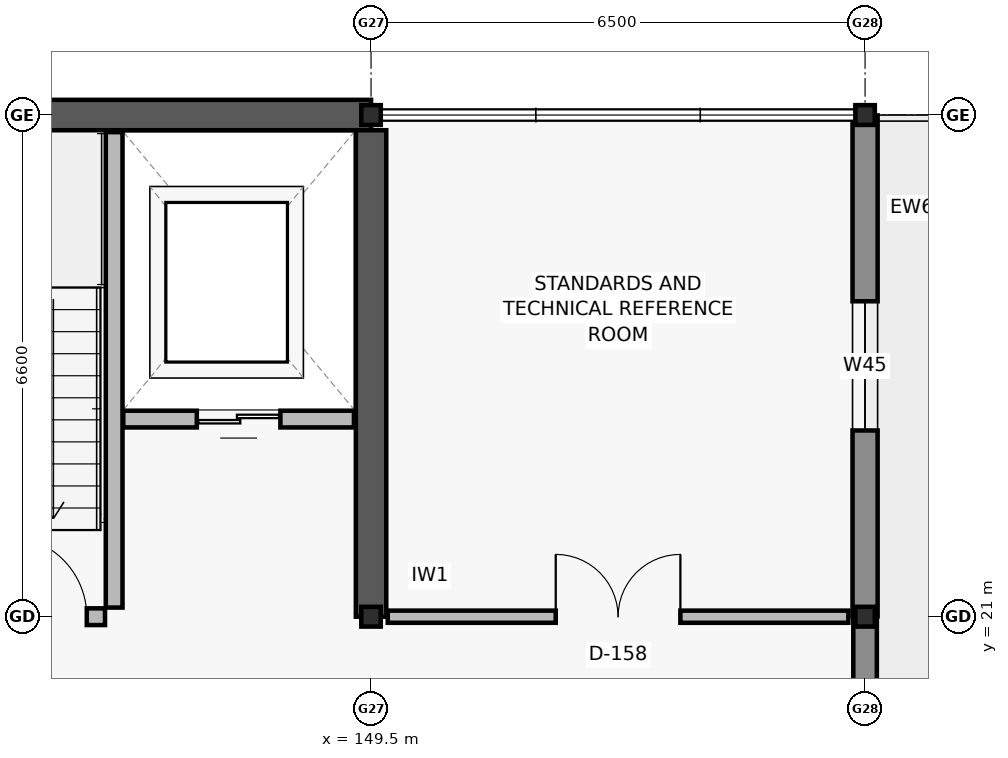
"""IFC4 building model, lengths in metres.
Left out: names, types, materials, properties, quantities, classifications, styles, units other than length and angle.
Written with IfcOpenShell. Run it as: python <this file> out.ifc"""

import sys

from ifc_helpers import new_model, si_unit, direction, frame, frame_2d, origin, origin_2d, place, context, subcontext, project, spatial, rectangle, i_section, extrude, element, fill, save


model = new_model("IFC4")
c1 = context("Model", 3, precision=1e-05, world=origin(), true_north=direction((0.0, 1.0)))
c2 = subcontext(c1, "Body", "Model", "MODEL_VIEW")
j1 = project(units=[si_unit("LENGTHUNIT", "METRE"), si_unit("PLANEANGLEUNIT", "RADIAN")], contexts=[c1])
p1 = place(None, origin())
s1 = spatial("IfcSite", under=j1, at=p1, CompositionType="ELEMENT")
p2 = place(p1, origin())
s2 = spatial("IfcBuilding", under=s1, at=p2, CompositionType="ELEMENT")
p3 = place(p2, frame((0.0, 0.0, 17.4)))
s3 = spatial("IfcBuildingStorey", under=s2, at=p3, CompositionType="ELEMENT", Elevation=17.4)
for number, where, z_axis, x_axis in (
    (1, (149.5, 21.0, 0.0), (0.0, 0.0, 1.0), (1.0, 0.0, 0.0)),
    (2, (149.5, 27.6, 0.0), (0.0, 0.0, 1.0), (1.0, 0.0, 0.0)),
    (3, (156.0, 21.0, 0.0), (0.0, 0.0, 1.0), (1.0, 0.0, 0.0)),
    (4, (156.0, 27.6, 0.0), (0.0, 0.0, 1.0), (1.0, 0.0, 0.0)),
):
    element("IfcColumn", number, at=place(p3, frame(where, z_axis=z_axis, x_axis=x_axis)), inside=s3, PredefinedType="COLUMN", context=c2, shape_type="SweptSolid", body=[
        extrude(i_section(OverallWidth=0.256, OverallDepth=0.26, WebThickness=0.01, FlangeThickness=0.017, FilletRadius=0.013, at=origin_2d()), origin(), (0.0, 0.0, 1.0), 3.9),
    ])
p4 = place(p3, frame((143.0, 27.6, 0.0), z_axis=(0.0, 0.0, 1.0), x_axis=(1.0, 0.0, 0.0)))
e5 = element("IfcWall", 5, at=p4, inside=s3, PredefinedType="SHEAR", context=c2, shape_type="SweptSolid", body=[
    extrude(rectangle(XDim=6.5, YDim=0.4, at=frame_2d((3.25, 0.0))), origin(), (0.0, 0.0, 1.0), 3.66),
])
p5 = place(p3, frame((149.5, 21.0, 0.0), z_axis=(0.0, 0.0, 1.0), x_axis=(0.0, 1.0, 0.0)))
e6 = element("IfcWall", 6, at=p5, inside=s3, PredefinedType="SHEAR", context=c2, shape_type="SweptSolid", body=[
    extrude(rectangle(XDim=6.4, YDim=0.4, at=frame_2d((3.2, 0.0))), origin(), (0.0, 0.0, 1.0), 3.66),
])
p6 = place(p3, frame((156.0, 20.995, 0.0), z_axis=(0.0, 0.0, 1.0), x_axis=(0.0, -1.0, 0.0)))
e7 = element("IfcWall", 7, at=p6, inside=s3, PredefinedType="SOLIDWALL", context=c2, shape_type="SweptSolid", body=[
    extrude(rectangle(XDim=6.59, YDim=0.31, at=frame_2d((3.295, 0.0))), origin(), (0.0, 0.0, 1.0), 3.02),
])
p7 = place(p6, frame((2.785, 0.0, 0.0)))
e8 = element("IfcOpeningElement", 8, at=p7, cuts=e7, PredefinedType="OPENING", context=c2, shape_type="SweptSolid", body=[
    extrude(rectangle(XDim=1.02, YDim=2.14, at=frame_2d((0.51, 1.07))), frame((0.0, 0.165, 0.0), z_axis=(0.0, -1.0, 0.0), x_axis=(1.0, 0.0, 0.0)), (0.0, 0.0, 1.0), 0.33),
])
p8 = place(p3, frame((156.0, 27.595, 0.0), z_axis=(0.0, 0.0, 1.0), x_axis=(0.0, -1.0, 0.0)))
e9 = element("IfcWall", 9, at=p8, inside=s3, PredefinedType="SOLIDWALL", context=c2, shape_type="SweptSolid", body=[
    extrude(rectangle(XDim=6.59, YDim=0.33, at=frame_2d((3.295, 0.0))), origin(), (0.0, 0.0, 1.0), 3.02),
])
p9 = place(p8, frame((2.445, 0.0, 0.8)))
e10 = element("IfcOpeningElement", 10, at=p9, cuts=e9, PredefinedType="OPENING", context=c2, shape_type="SweptSolid", body=[
    extrude(rectangle(XDim=1.7, YDim=1.95, at=frame_2d((0.85, 0.975))), frame((0.0, 0.175, 0.0), z_axis=(0.0, -1.0, 0.0), x_axis=(1.0, 0.0, 0.0)), (0.0, 0.0, 1.0), 0.35),
])
p10 = place(p3, frame((146.12, 21.12, 0.0), z_axis=(0.0, 0.0, 1.0), x_axis=(0.0, 1.0, 0.0)))
e11 = element("IfcWall", 11, at=p10, inside=s3, PredefinedType="SOLIDWALL", context=c2, shape_type="SweptSolid", body=[
    extrude(rectangle(XDim=6.255, YDim=0.22, at=frame_2d((3.127, 0.0))), origin(), (0.0, 0.0, 1.0), 3.66),
])
p11 = place(p3, frame((143.26, 21.0, 0.0), z_axis=(0.0, 0.0, 1.0), x_axis=(1.0, 0.0, 0.0)))
e12 = element("IfcWall", 12, at=p11, inside=s3, PredefinedType="SOLIDWALL", context=c2, shape_type="SweptSolid", body=[
    extrude(rectangle(XDim=2.74, YDim=0.22, at=frame_2d((1.37, 0.0))), origin(), (0.0, 0.0, 1.0), 3.02),
])
p12 = place(p11, frame((1.44, 0.0, 0.0)))
e13 = element("IfcOpeningElement", 13, at=p12, cuts=e12, PredefinedType="OPENING", context=c2, shape_type="SweptSolid", body=[
    extrude(rectangle(XDim=1.06, YDim=2.1, at=frame_2d((0.53, 1.05))), frame((0.0, 0.12, 0.0), z_axis=(0.0, -1.0, 0.0), x_axis=(1.0, 0.0, 0.0)), (0.0, 0.0, 1.0), 0.24),
])
p13 = place(p3, frame((146.24, 23.6, 0.0), z_axis=(0.0, 0.0, 1.0), x_axis=(1.0, 0.0, 0.0)))
e14 = element("IfcWall", 14, at=p13, inside=s3, PredefinedType="SOLIDWALL", context=c2, shape_type="SweptSolid", body=[
    extrude(rectangle(XDim=3.035, YDim=0.22, at=frame_2d((1.518, 0.0))), origin(), (0.0, 0.0, 1.0), 3.66),
])
p14 = place(p13, frame((0.968, 0.0, 0.0)))
e15 = element("IfcOpeningElement", 15, at=p14, cuts=e14, PredefinedType="OPENING", context=c2, shape_type="SweptSolid", body=[
    extrude(rectangle(XDim=1.1, YDim=2.1, at=frame_2d((0.55, 1.05))), frame((0.0, 0.12, 0.0), z_axis=(0.0, -1.0, 0.0), x_axis=(1.0, 0.0, 0.0)), (0.0, 0.0, 1.0), 0.24),
])
p15 = place(p3, frame((149.72, 21.0, 0.0), z_axis=(0.0, 0.0, 1.0), x_axis=(1.0, 0.0, 0.0)))
e16 = element("IfcWall", 16, at=p15, inside=s3, PredefinedType="PARTITIONING", context=c2, shape_type="SweptSolid", body=[
    extrude(rectangle(XDim=6.06, YDim=0.16, at=frame_2d((3.03, 0.0))), origin(), (0.0, 0.0, 1.0), 3.0),
])
p16 = place(p15, frame((2.21, 0.0, 0.0)))
e17 = element("IfcOpeningElement", 17, at=p16, cuts=e16, PredefinedType="OPENING", context=c2, shape_type="SweptSolid", body=[
    extrude(rectangle(XDim=1.64, YDim=2.2, at=frame_2d((0.82, 1.1))), frame((0.0, 0.09, 0.0), z_axis=(0.0, -1.0, 0.0), x_axis=(1.0, 0.0, 0.0)), (0.0, 0.0, 1.0), 0.18),
])
p17 = place(p9, origin())
e18 = element("IfcWindow", 18, at=p17, inside=s3, PartitioningType="DOUBLE_PANEL_VERTICAL", PredefinedType="WINDOW", context=c2, shape_type="SweptSolid", body=[
    extrude(rectangle(XDim=1.7, YDim=1.95, at=frame_2d((0.85, 0.975))), frame((0.0, 0.03, 0.0), z_axis=(0.0, -1.0, 0.0), x_axis=(1.0, 0.0, 0.0)), (0.0, 0.0, 1.0), 0.06),
])
fill(e10, e18)
p18 = place(p12, origin())
e19 = element("IfcDoor", 19, at=p18, inside=s3, OperationType="SINGLE_SWING_LEFT", PredefinedType="DOOR", context=c2, shape_type="SweptSolid", body=[
    extrude(rectangle(XDim=1.06, YDim=2.1, at=frame_2d((0.53, 1.05))), frame((0.0, 0.025, 0.0), z_axis=(0.0, -1.0, 0.0), x_axis=(1.0, 0.0, 0.0)), (0.0, 0.0, 1.0), 0.05),
])
fill(e13, e19)
p19 = place(p14, origin())
e20 = element("IfcDoor", 20, at=p19, inside=s3, OperationType="DOUBLE_DOOR_SLIDING", PredefinedType="DOOR", context=c2, shape_type="SweptSolid", body=[
    extrude(rectangle(XDim=1.1, YDim=2.1, at=frame_2d((0.55, 1.05))), frame((0.0, 0.025, 0.0), z_axis=(0.0, -1.0, 0.0), x_axis=(1.0, 0.0, 0.0)), (0.0, 0.0, 1.0), 0.05),
])
fill(e15, e20)
p20 = place(p16, origin())
e21 = element("IfcDoor", 21, at=p20, inside=s3, OperationType="DOUBLE_DOOR_SINGLE_SWING", PredefinedType="DOOR", context=c2, shape_type="SweptSolid", body=[
    extrude(rectangle(XDim=1.64, YDim=2.2, at=frame_2d((0.82, 1.1))), frame((0.0, 0.025, 0.0), z_axis=(0.0, -1.0, 0.0), x_axis=(1.0, 0.0, 0.0)), (0.0, 0.0, 1.0), 0.05),
])
fill(e17, e21)
save(model, sys.argv[1])
